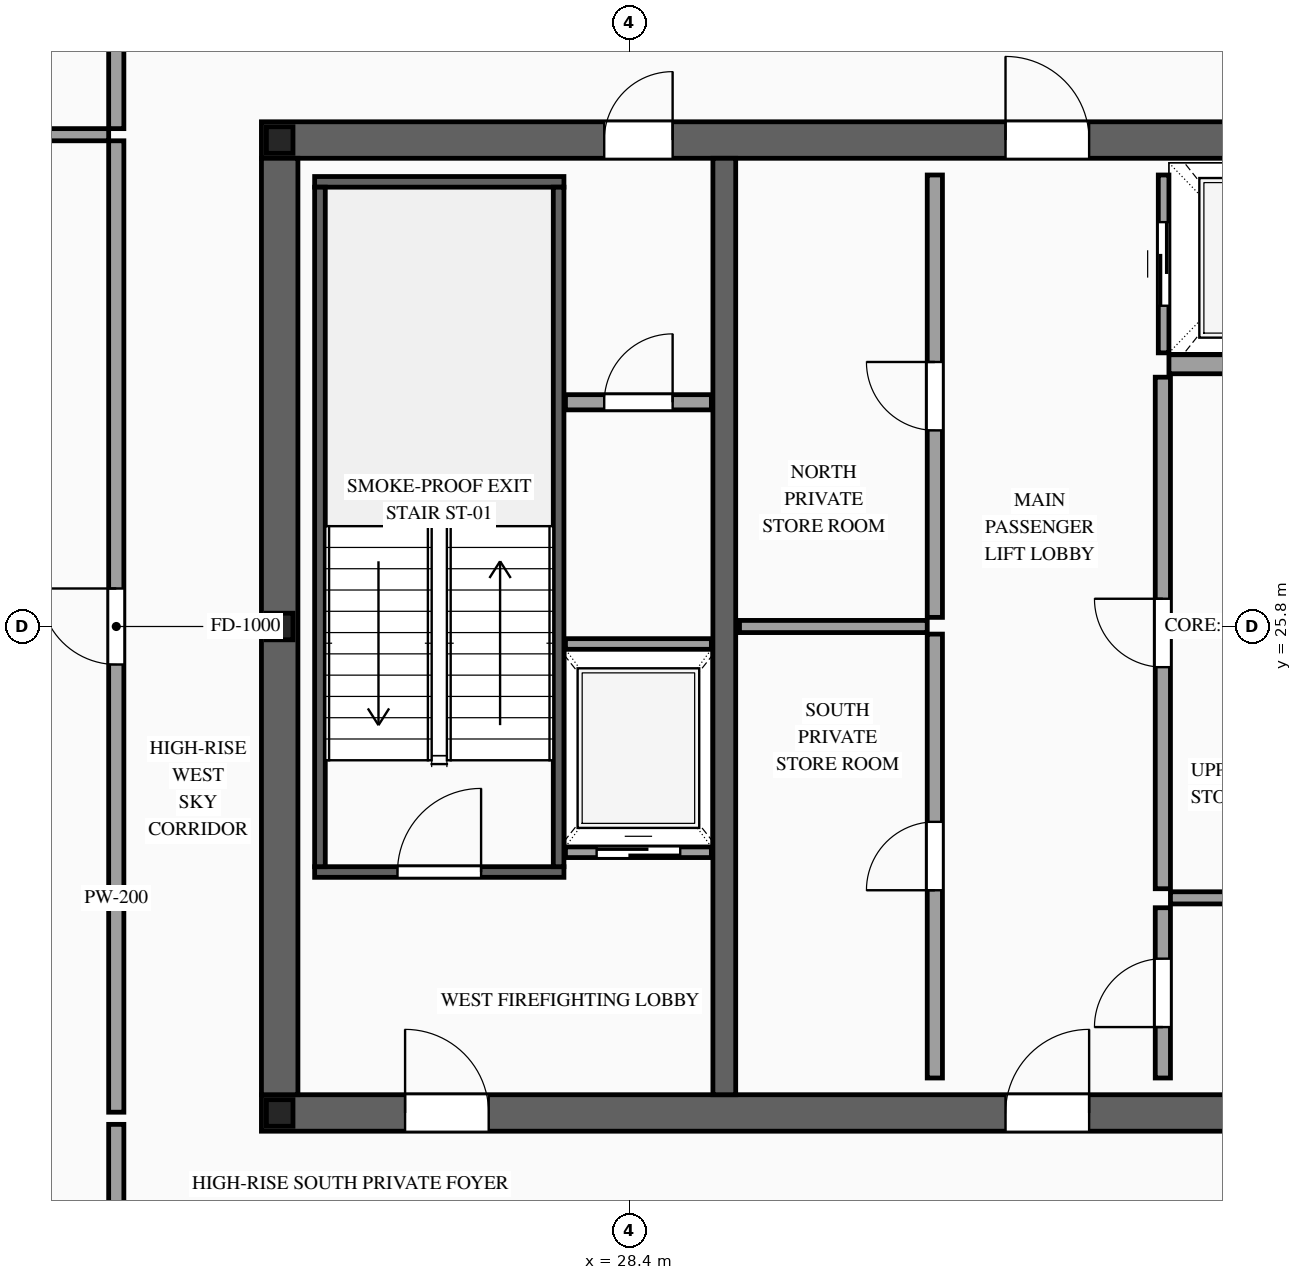
"""IFC4 building model, lengths in metres.
Left out: names, types, materials, properties, quantities, classifications, styles, units other than length and angle.
Written with IfcOpenShell. Run it as: python <this file> out.ifc"""

import sys

from ifc_helpers import new_model, si_unit, direction, frame, frame_2d, origin, origin_2d, place, context, subcontext, project, spatial, rectangle, i_section, extrude, source, transform, mapped, element, fill, save


model = new_model("IFC4")
c1 = context("Model", 3, precision=1e-05, world=origin(), true_north=direction((0.0, 1.0)))
c2 = subcontext(c1, "Body", "Model", "MODEL_VIEW")
j1 = project(units=[si_unit("LENGTHUNIT", "METRE"), si_unit("PLANEANGLEUNIT", "RADIAN")], contexts=[c1])
p1 = place(None, origin())
s1 = spatial("IfcSite", under=j1, at=p1, CompositionType="ELEMENT")
p2 = place(p1, origin())
s2 = spatial("IfcBuilding", under=s1, at=p2, CompositionType="ELEMENT")
p3 = place(p2, frame((0.0, 0.0, 339.2)))
s3 = spatial("IfcBuildingStorey", under=s2, at=p3, CompositionType="ELEMENT", Elevation=339.2)
p4 = place(p3, frame((23.56, 19.4, 0.0), z_axis=(0.0, 0.0, 1.0), x_axis=(1.0, 0.0, 0.0)))
e1 = element("IfcWall", 1, at=p4, inside=s3, PredefinedType="SHEAR", context=c2, shape_type="SweptSolid", body=[
    extrude(rectangle(XDim=26.88, YDim=0.48, at=frame_2d((13.44, 0.0))), origin(), (0.0, 0.0, 1.0), 4.0),
])
p5 = place(p4, frame((1.89, 0.0, 0.0)))
e2 = element("IfcOpeningElement", 2, at=p5, cuts=e1, PredefinedType="OPENING", context=c2, shape_type="SweptSolid", body=[
    extrude(rectangle(XDim=1.1, YDim=2.2, at=frame_2d((0.55, 1.1))), frame((0.0, 0.255, 0.0), z_axis=(0.0, -1.0, 0.0), x_axis=(1.0, 0.0, 0.0)), (0.0, 0.0, 1.0), 0.51),
])
p6 = place(p4, frame((9.79, 0.0, 0.0)))
e3 = element("IfcOpeningElement", 3, at=p6, cuts=e1, PredefinedType="OPENING", context=c2, shape_type="SweptSolid", body=[
    extrude(rectangle(XDim=1.1, YDim=2.2, at=frame_2d((0.55, 1.1))), frame((0.0, 0.255, 0.0), z_axis=(0.0, -1.0, 0.0), x_axis=(1.0, 0.0, 0.0)), (0.0, 0.0, 1.0), 0.51),
])
p7 = place(p4, frame((22.99, 0.0, 0.0)))
e4 = element("IfcOpeningElement", 4, at=p7, cuts=e1, PredefinedType="OPENING", context=c2, shape_type="SweptSolid", body=[
    extrude(rectangle(XDim=1.1, YDim=2.2, at=frame_2d((0.55, 1.1))), frame((0.0, 0.255, 0.0), z_axis=(0.0, -1.0, 0.0), x_axis=(1.0, 0.0, 0.0)), (0.0, 0.0, 1.0), 0.51),
])
p8 = place(p4, frame((19.61, 0.0, 0.0)))
e5 = element("IfcOpeningElement", 5, at=p8, cuts=e1, PredefinedType="OPENING", context=c2, shape_type="SweptSolid", body=[
    extrude(rectangle(XDim=0.9, YDim=2.15, at=frame_2d((0.45, 1.075))), frame((0.0, 0.255, 0.0), z_axis=(0.0, -1.0, 0.0), x_axis=(1.0, 0.0, 0.0)), (0.0, 0.0, 1.0), 0.51),
])
p9 = place(p4, frame((18.17, 0.0, 0.0)))
e6 = element("IfcOpeningElement", 6, at=p9, cuts=e1, PredefinedType="OPENING", context=c2, shape_type="SweptSolid", body=[
    extrude(rectangle(XDim=0.9, YDim=2.15, at=frame_2d((0.45, 1.075))), frame((0.0, 0.255, 0.0), z_axis=(0.0, -1.0, 0.0), x_axis=(1.0, 0.0, 0.0)), (0.0, 0.0, 1.0), 0.51),
])
p10 = place(p3, frame((23.56, 32.2, 0.0), z_axis=(0.0, 0.0, 1.0), x_axis=(1.0, 0.0, 0.0)))
e7 = element("IfcWall", 7, at=p10, inside=s3, PredefinedType="SHEAR", context=c2, shape_type="SweptSolid", body=[
    extrude(rectangle(XDim=26.88, YDim=0.48, at=frame_2d((13.44, 0.0))), origin(), (0.0, 0.0, 1.0), 4.0),
])
p11 = place(p10, frame((4.51, 0.0, 0.0)))
e8 = element("IfcOpeningElement", 8, at=p11, cuts=e7, PredefinedType="OPENING", context=c2, shape_type="SweptSolid", body=[
    extrude(rectangle(XDim=0.9, YDim=2.15, at=frame_2d((0.45, 1.075))), frame((0.0, 0.255, 0.0), z_axis=(0.0, -1.0, 0.0), x_axis=(1.0, 0.0, 0.0)), (0.0, 0.0, 1.0), 0.51),
])
p12 = place(p10, frame((9.79, 0.0, 0.0)))
e9 = element("IfcOpeningElement", 9, at=p12, cuts=e7, PredefinedType="OPENING", context=c2, shape_type="SweptSolid", body=[
    extrude(rectangle(XDim=1.1, YDim=2.2, at=frame_2d((0.55, 1.1))), frame((0.0, 0.255, 0.0), z_axis=(0.0, -1.0, 0.0), x_axis=(1.0, 0.0, 0.0)), (0.0, 0.0, 1.0), 0.51),
])
p13 = place(p10, frame((15.64, 0.0, 0.0)))
e10 = element("IfcOpeningElement", 10, at=p13, cuts=e7, PredefinedType="OPENING", context=c2, shape_type="SweptSolid", body=[
    extrude(rectangle(XDim=1.1, YDim=2.2, at=frame_2d((0.55, 1.1))), frame((0.0, 0.255, 0.0), z_axis=(0.0, -1.0, 0.0), x_axis=(1.0, 0.0, 0.0)), (0.0, 0.0, 1.0), 0.51),
])
p14 = place(p10, frame((18.74, 0.0, 0.0)))
e11 = element("IfcOpeningElement", 11, at=p14, cuts=e7, PredefinedType="OPENING", context=c2, shape_type="SweptSolid", body=[
    extrude(rectangle(XDim=1.1, YDim=2.2, at=frame_2d((0.55, 1.1))), frame((0.0, 0.255, 0.0), z_axis=(0.0, -1.0, 0.0), x_axis=(1.0, 0.0, 0.0)), (0.0, 0.0, 1.0), 0.51),
])
m1 = source(origin(), c2, "Body", "SweptSolid", [
    extrude(rectangle(XDim=12.32, YDim=0.48, at=frame_2d((6.16, 0.0))), origin(), (0.0, 0.0, 1.0), 4.0),
])
p15 = place(p3, frame((23.8, 19.64, 0.0), z_axis=(0.0, 0.0, 1.0), x_axis=(0.0, 1.0, 0.0)))
e12 = element("IfcWall", 12, at=p15, inside=s3, PredefinedType="SHEAR", context=c2, shape_type="MappedRepresentation", body=[
    mapped(m1, transform((0.0, 0.0, 0.0), scale=1.0)),
])
m2 = source(origin(), c2, "Body", "SweptSolid", [
    extrude(rectangle(XDim=12.32, YDim=0.3, at=frame_2d((6.16, 0.0))), origin(), (0.0, 0.0, 1.0), 4.0),
])
p16 = place(p3, frame((29.65, 19.64, 0.0), z_axis=(0.0, 0.0, 1.0), x_axis=(0.0, 1.0, 0.0)))
e13 = element("IfcWall", 13, at=p16, inside=s3, PredefinedType="SOLIDWALL", context=c2, shape_type="MappedRepresentation", body=[
    mapped(m2, transform((0.0, 0.0, 0.0), scale=1.0)),
])
m3 = source(origin(), c2, "Body", "SweptSolid", [
    extrude(i_section(OverallWidth=0.35, OverallDepth=0.35, WebThickness=0.012, FlangeThickness=0.019, at=origin_2d()), origin(), (0.0, 0.0, 1.0), 4.0),
])
for number, where, z_axis, x_axis in (
    (14, (23.8, 19.4, 0.0), (0.0, 0.0, 1.0), (1.0, 0.0, 0.0)),
    (15, (23.8, 25.8, 0.0), (0.0, 0.0, 1.0), (1.0, 0.0, 0.0)),
    (16, (23.8, 32.2, 0.0), (0.0, 0.0, 1.0), (1.0, 0.0, 0.0)),
):
    element("IfcColumn", number, at=place(p3, frame(where, z_axis=z_axis, x_axis=x_axis)), inside=s3, PredefinedType="COLUMN", context=c2, shape_type="MappedRepresentation", body=[
        mapped(m3, transform((0.0, 0.0, 0.0), scale=1.0)),
    ])
p17 = place(p3, frame((27.56, 22.83, 0.0), z_axis=(0.0, 0.0, 1.0), x_axis=(1.0, 0.0, 0.0)))
e17 = element("IfcWall", 17, at=p17, inside=s3, PredefinedType="SOLIDWALL", context=c2, shape_type="SweptSolid", body=[
    extrude(rectangle(XDim=1.92, YDim=0.14, at=frame_2d((0.96, 0.0))), origin(), (0.0, 0.0, 1.0), 3.76),
])
p18 = place(p17, frame((0.41, 0.0, 0.0)))
e18 = element("IfcOpeningElement", 18, at=p18, cuts=e17, PredefinedType="OPENING", context=c2, shape_type="SweptSolid", body=[
    extrude(rectangle(XDim=1.1, YDim=2.2, at=frame_2d((0.55, 1.1))), frame((0.0, 0.085, 0.0), z_axis=(0.0, -1.0, 0.0), x_axis=(1.0, 0.0, 0.0)), (0.0, 0.0, 1.0), 0.17),
])
m4 = source(origin(), c2, "Body", "SweptSolid", [
    extrude(rectangle(XDim=1.92, YDim=0.14, at=frame_2d((0.96, 0.0))), origin(), (0.0, 0.0, 1.0), 3.76),
])
p19 = place(p3, frame((27.56, 25.57, 0.0), z_axis=(0.0, 0.0, 1.0), x_axis=(1.0, 0.0, 0.0)))
e19 = element("IfcWall", 19, at=p19, inside=s3, PredefinedType="SOLIDWALL", context=c2, shape_type="MappedRepresentation", body=[
    mapped(m4, transform((0.0, 0.0, 0.0), scale=1.0)),
])
p20 = place(p3, frame((35.43, 29.4, 0.0), z_axis=(0.0, 0.0, 1.0), x_axis=(0.0, 1.0, 0.0)))
e20 = element("IfcWall", 20, at=p20, inside=s3, PredefinedType="SOLIDWALL", context=c2, shape_type="SweptSolid", body=[
    extrude(rectangle(XDim=2.34, YDim=0.14, at=frame_2d((1.17, 0.0))), origin(), (0.0, 0.0, 1.0), 3.76),
])
p21 = place(p20, frame((0.62, 0.0, 0.0)))
e21 = element("IfcOpeningElement", 21, at=p21, cuts=e20, PredefinedType="OPENING", context=c2, shape_type="SweptSolid", body=[
    extrude(rectangle(XDim=1.1, YDim=2.2, at=frame_2d((0.55, 1.1))), frame((0.0, 0.085, 0.0), z_axis=(0.0, -1.0, 0.0), x_axis=(1.0, 0.0, 0.0)), (0.0, 0.0, 1.0), 0.17),
])
m5 = source(origin(), c2, "Body", "SweptSolid", [
    extrude(rectangle(XDim=2.4, YDim=0.25, at=frame_2d((1.2, 0.0))), origin(), (0.0, 0.0, 1.0), 3.76),
])
p22 = place(p3, frame((35.5, 29.25, 0.0), z_axis=(0.0, 0.0, 1.0), x_axis=(1.0, 0.0, 0.0)))
e22 = element("IfcWall", 22, at=p22, inside=s3, PredefinedType="SOLIDWALL", context=c2, shape_type="MappedRepresentation", body=[
    mapped(m5, transform((0.0, 0.0, 0.0), scale=1.0)),
])
p23 = place(p3, frame((24.26, 22.57, 0.0), z_axis=(0.0, 0.0, 1.0), x_axis=(1.0, 0.0, 0.0)))
e23 = element("IfcWall", 23, at=p23, inside=s3, PredefinedType="SOLIDWALL", context=c2, shape_type="SweptSolid", body=[
    extrude(rectangle(XDim=3.28, YDim=0.14, at=frame_2d((1.64, 0.0))), origin(), (0.0, 0.0, 1.0), 3.76),
])
p24 = place(p23, frame((1.09, 0.0, 0.0)))
e24 = element("IfcOpeningElement", 24, at=p24, cuts=e23, PredefinedType="OPENING", context=c2, shape_type="SweptSolid", body=[
    extrude(rectangle(XDim=1.1, YDim=2.2, at=frame_2d((0.55, 1.1))), frame((0.0, 0.085, 0.0), z_axis=(0.0, -1.0, 0.0), x_axis=(1.0, 0.0, 0.0)), (0.0, 0.0, 1.0), 0.17),
])
m6 = source(origin(), c2, "Body", "SweptSolid", [
    extrude(rectangle(XDim=3.28, YDim=0.14, at=frame_2d((1.64, 0.0))), origin(), (0.0, 0.0, 1.0), 3.76),
])
p25 = place(p3, frame((24.26, 31.65, 0.0), z_axis=(0.0, 0.0, 1.0), x_axis=(1.0, 0.0, 0.0)))
e25 = element("IfcWall", 25, at=p25, inside=s3, PredefinedType="SOLIDWALL", context=c2, shape_type="MappedRepresentation", body=[
    mapped(m6, transform((0.0, 0.0, 0.0), scale=1.0)),
])
m7 = source(origin(), c2, "Body", "SweptSolid", [
    extrude(rectangle(XDim=8.94, YDim=0.14, at=frame_2d((4.47, 0.0))), origin(), (0.0, 0.0, 1.0), 3.76),
])
for number, where, z_axis, x_axis in (
    (26, (24.33, 22.64, 0.0), (0.0, 0.0, 1.0), (0.0, 1.0, 0.0)),
    (27, (27.47, 22.64, 0.0), (0.0, 0.0, 1.0), (0.0, 1.0, 0.0)),
):
    element("IfcWall", number, at=place(p3, frame(where, z_axis=z_axis, x_axis=x_axis)), inside=s3, PredefinedType="SOLIDWALL", context=c2, shape_type="MappedRepresentation", body=[
        mapped(m7, transform((0.0, 0.0, 0.0), scale=1.0)),
    ])
p26 = place(p3, frame((27.56, 28.75, 0.0), z_axis=(0.0, 0.0, 1.0), x_axis=(1.0, 0.0, 0.0)))
e28 = element("IfcWall", 28, at=p26, inside=s3, PredefinedType="PARTITIONING", context=c2, shape_type="SweptSolid", body=[
    extrude(rectangle(XDim=1.92, YDim=0.2, at=frame_2d((0.96, 0.0))), origin(), (0.0, 0.0, 1.0), 3.76),
])
p27 = place(p26, frame((0.51, 0.0, 0.0)))
e29 = element("IfcOpeningElement", 29, at=p27, cuts=e28, PredefinedType="OPENING", context=c2, shape_type="SweptSolid", body=[
    extrude(rectangle(XDim=0.9, YDim=2.15, at=frame_2d((0.45, 1.075))), frame((0.0, 0.115, 0.0), z_axis=(0.0, -1.0, 0.0), x_axis=(1.0, 0.0, 0.0)), (0.0, 0.0, 1.0), 0.23),
])
p28 = place(p3, frame((32.42, 19.86, 0.0), z_axis=(0.0, 0.0, 1.0), x_axis=(0.0, 1.0, 0.0)))
e30 = element("IfcWall", 30, at=p28, inside=s3, PredefinedType="PARTITIONING", context=c2, shape_type="SweptSolid", body=[
    extrude(rectangle(XDim=5.84, YDim=0.2, at=frame_2d((2.92, 0.0))), origin(), (0.0, 0.0, 1.0), 3.76),
])
p29 = place(p28, frame((2.47, 0.0, 0.0)))
e31 = element("IfcOpeningElement", 31, at=p29, cuts=e30, PredefinedType="OPENING", context=c2, shape_type="SweptSolid", body=[
    extrude(rectangle(XDim=0.9, YDim=2.15, at=frame_2d((0.45, 1.075))), frame((0.0, 0.115, 0.0), z_axis=(0.0, -1.0, 0.0), x_axis=(1.0, 0.0, 0.0)), (0.0, 0.0, 1.0), 0.23),
])
p30 = place(p3, frame((32.42, 25.92, 0.0), z_axis=(0.0, 0.0, 1.0), x_axis=(0.0, 1.0, 0.0)))
e32 = element("IfcWall", 32, at=p30, inside=s3, PredefinedType="PARTITIONING", context=c2, shape_type="SweptSolid", body=[
    extrude(rectangle(XDim=5.82, YDim=0.2, at=frame_2d((2.91, 0.0))), origin(), (0.0, 0.0, 1.0), 3.76),
])
p31 = place(p30, frame((2.46, 0.0, 0.0)))
e33 = element("IfcOpeningElement", 33, at=p31, cuts=e32, PredefinedType="OPENING", context=c2, shape_type="SweptSolid", body=[
    extrude(rectangle(XDim=0.9, YDim=2.15, at=frame_2d((0.45, 1.075))), frame((0.0, 0.115, 0.0), z_axis=(0.0, -1.0, 0.0), x_axis=(1.0, 0.0, 0.0)), (0.0, 0.0, 1.0), 0.23),
])
m8 = source(origin(), c2, "Body", "SweptSolid", [
    extrude(rectangle(XDim=2.47, YDim=0.16, at=frame_2d((1.235, 0.0))), origin(), (0.0, 0.0, 1.0), 3.76),
])
p32 = place(p3, frame((29.85, 25.8, 0.0), z_axis=(0.0, 0.0, 1.0), x_axis=(1.0, 0.0, 0.0)))
e34 = element("IfcWall", 34, at=p32, inside=s3, PredefinedType="PARTITIONING", context=c2, shape_type="MappedRepresentation", body=[
    mapped(m8, transform((0.0, 0.0, 0.0), scale=1.0)),
])
p33 = place(p3, frame((35.42, 19.86, 0.0), z_axis=(0.0, 0.0, 1.0), x_axis=(0.0, 1.0, 0.0)))
e35 = element("IfcWall", 35, at=p33, inside=s3, PredefinedType="PARTITIONING", context=c2, shape_type="SweptSolid", body=[
    extrude(rectangle(XDim=2.24, YDim=0.2, at=frame_2d((1.12, 0.0))), origin(), (0.0, 0.0, 1.0), 3.76),
])
p34 = place(p33, frame((0.67, 0.0, 0.0)))
e36 = element("IfcOpeningElement", 36, at=p34, cuts=e35, PredefinedType="OPENING", context=c2, shape_type="SweptSolid", body=[
    extrude(rectangle(XDim=0.9, YDim=2.15, at=frame_2d((0.45, 1.075))), frame((0.0, 0.115, 0.0), z_axis=(0.0, -1.0, 0.0), x_axis=(1.0, 0.0, 0.0)), (0.0, 0.0, 1.0), 0.23),
])
p35 = place(p3, frame((35.42, 22.35, 0.0), z_axis=(0.0, 0.0, 1.0), x_axis=(0.0, 1.0, 0.0)))
e37 = element("IfcWall", 37, at=p35, inside=s3, PredefinedType="PARTITIONING", context=c2, shape_type="SweptSolid", body=[
    extrude(rectangle(XDim=6.73, YDim=0.2, at=frame_2d((3.365, 0.0))), origin(), (0.0, 0.0, 1.0), 3.76),
])
p36 = place(p35, frame((2.915, 0.0, 0.0)))
e38 = element("IfcOpeningElement", 38, at=p36, cuts=e37, PredefinedType="OPENING", context=c2, shape_type="SweptSolid", body=[
    extrude(rectangle(XDim=0.9, YDim=2.15, at=frame_2d((0.45, 1.075))), frame((0.0, 0.115, 0.0), z_axis=(0.0, -1.0, 0.0), x_axis=(1.0, 0.0, 0.0)), (0.0, 0.0, 1.0), 0.23),
])
m9 = source(origin(), c2, "Body", "SweptSolid", [
    extrude(rectangle(XDim=2.36, YDim=0.16, at=frame_2d((1.18, 0.0))), origin(), (0.0, 0.0, 1.0), 3.76),
])
p37 = place(p3, frame((35.52, 22.23, 0.0), z_axis=(0.0, 0.0, 1.0), x_axis=(1.0, 0.0, 0.0)))
e39 = element("IfcWall", 39, at=p37, inside=s3, PredefinedType="PARTITIONING", context=c2, shape_type="MappedRepresentation", body=[
    mapped(m9, transform((0.0, 0.0, 0.0), scale=1.0)),
])
m10 = source(origin(), c2, "Body", "SweptSolid", [
    extrude(rectangle(XDim=1.7, YDim=0.2, at=frame_2d((0.85, 0.0))), origin(), (0.0, 0.0, 1.0), 3.76),
])
for number, where, z_axis, x_axis in (
    (40, (21.65, 32.35, 0.0), (0.0, 0.0, 1.0), (0.0, 1.0, 0.0)),
    (41, (21.65, 17.55, 0.0), (0.0, 0.0, 1.0), (0.0, 1.0, 0.0)),
):
    element("IfcWall", number, at=place(p3, frame(where, z_axis=z_axis, x_axis=x_axis)), inside=s3, PredefinedType="PARTITIONING", context=c2, shape_type="MappedRepresentation", body=[
        mapped(m10, transform((0.0, 0.0, 0.0), scale=1.0)),
    ])
p38 = place(p3, frame((21.65, 19.41, 0.0), z_axis=(0.0, 0.0, 1.0), x_axis=(0.0, 1.0, 0.0)))
e42 = element("IfcWall", 42, at=p38, inside=s3, PredefinedType="PARTITIONING", context=c2, shape_type="SweptSolid", body=[
    extrude(rectangle(XDim=12.78, YDim=0.2, at=frame_2d((6.39, 0.0))), origin(), (0.0, 0.0, 1.0), 3.76),
])
p39 = place(p38, frame((5.89, 0.0, 0.0)))
e43 = element("IfcOpeningElement", 43, at=p39, cuts=e42, PredefinedType="OPENING", context=c2, shape_type="SweptSolid", body=[
    extrude(rectangle(XDim=1.0, YDim=2.2, at=frame_2d((0.5, 1.1))), frame((0.0, 0.115, 0.0), z_axis=(0.0, -1.0, 0.0), x_axis=(1.0, 0.0, 0.0)), (0.0, 0.0, 1.0), 0.23),
])
m11 = source(origin(), c2, "Body", "SweptSolid", [
    extrude(rectangle(XDim=3.5, YDim=0.16, at=frame_2d((1.75, 0.0))), origin(), (0.0, 0.0, 1.0), 3.305),
])
p40 = place(p3, frame((18.05, 32.27, 0.0), z_axis=(0.0, 0.0, 1.0), x_axis=(1.0, 0.0, 0.0)))
e44 = element("IfcWall", 44, at=p40, inside=s3, PredefinedType="PARTITIONING", context=c2, shape_type="MappedRepresentation", body=[
    mapped(m11, transform((0.0, 0.0, 0.0), scale=1.0)),
])
m12 = source(origin(), c2, "Body", "SweptSolid", [
    extrude(rectangle(XDim=1.1, YDim=2.2, at=frame_2d((0.55, 1.1))), frame((0.0, 0.025, 0.0), z_axis=(0.0, -1.0, 0.0), x_axis=(1.0, 0.0, 0.0)), (0.0, 0.0, 1.0), 0.05),
])
p41 = place(p18, origin())
e45 = element("IfcDoor", 45, at=p41, inside=s3, OperationType="SLIDING_TO_LEFT", PredefinedType="DOOR", context=c2, shape_type="MappedRepresentation", body=[
    mapped(m12, transform((0.0, 0.0, 0.0), scale=1.0)),
])
fill(e18, e45)
p42 = place(p21, origin())
e46 = element("IfcDoor", 46, at=p42, inside=s3, OperationType="SLIDING_TO_RIGHT", PredefinedType="DOOR", context=c2, shape_type="MappedRepresentation", body=[
    mapped(m12, transform((0.0, 0.0, 0.0), scale=1.0)),
])
fill(e21, e46)
m13 = source(origin(), c2, "Body", "SweptSolid", [
    extrude(rectangle(XDim=1.1, YDim=2.2, at=frame_2d((0.55, 1.1))), frame((0.0, 0.025, 0.0), z_axis=(0.0, -1.0, 0.0), x_axis=(1.0, 0.0, 0.0)), (0.0, 0.0, 1.0), 0.05),
])
p43 = place(p24, origin())
e47 = element("IfcDoor", 47, at=p43, inside=s3, OperationType="SINGLE_SWING_RIGHT", PredefinedType="DOOR", context=c2, shape_type="MappedRepresentation", body=[
    mapped(m13, transform((0.0, 0.0, 0.0), scale=1.0)),
])
fill(e24, e47)
p44 = place(p5, origin())
e48 = element("IfcDoor", 48, at=p44, inside=s3, OperationType="SINGLE_SWING_LEFT", PredefinedType="DOOR", context=c2, shape_type="MappedRepresentation", body=[
    mapped(m13, transform((0.0, 0.0, 0.0), scale=1.0)),
])
fill(e2, e48)
p45 = place(p6, origin())
e49 = element("IfcDoor", 49, at=p45, inside=s3, OperationType="SINGLE_SWING_RIGHT", PredefinedType="DOOR", context=c2, shape_type="MappedRepresentation", body=[
    mapped(m13, transform((0.0, 0.0, 0.0), scale=1.0)),
])
fill(e3, e49)
m14 = source(origin(), c2, "Body", "SweptSolid", [
    extrude(rectangle(XDim=0.9, YDim=2.15, at=frame_2d((0.45, 1.075))), frame((0.0, 0.025, 0.0), z_axis=(0.0, -1.0, 0.0), x_axis=(1.0, 0.0, 0.0)), (0.0, 0.0, 1.0), 0.05),
])
p46 = place(p11, origin())
e50 = element("IfcDoor", 50, at=p46, inside=s3, OperationType="SINGLE_SWING_RIGHT", PredefinedType="DOOR", context=c2, shape_type="MappedRepresentation", body=[
    mapped(m14, transform((0.0, 0.0, 0.0), scale=1.0)),
])
fill(e8, e50)
p47 = place(p12, origin())
e51 = element("IfcDoor", 51, at=p47, inside=s3, OperationType="SINGLE_SWING_LEFT", PredefinedType="DOOR", context=c2, shape_type="MappedRepresentation", body=[
    mapped(m13, transform((0.0, 0.0, 0.0), scale=1.0)),
])
fill(e9, e51)
p48 = place(p27, origin())
e52 = element("IfcDoor", 52, at=p48, inside=s3, OperationType="SINGLE_SWING_RIGHT", PredefinedType="DOOR", context=c2, shape_type="MappedRepresentation", body=[
    mapped(m14, transform((0.0, 0.0, 0.0), scale=1.0)),
])
fill(e29, e52)
p49 = place(p29, origin())
e53 = element("IfcDoor", 53, at=p49, inside=s3, OperationType="SINGLE_SWING_LEFT", PredefinedType="DOOR", context=c2, shape_type="MappedRepresentation", body=[
    mapped(m14, transform((0.0, 0.0, 0.0), scale=1.0)),
])
fill(e31, e53)
p50 = place(p31, origin())
e54 = element("IfcDoor", 54, at=p50, inside=s3, OperationType="SINGLE_SWING_RIGHT", PredefinedType="DOOR", context=c2, shape_type="MappedRepresentation", body=[
    mapped(m14, transform((0.0, 0.0, 0.0), scale=1.0)),
])
fill(e33, e54)
p51 = place(p34, origin())
e55 = element("IfcDoor", 55, at=p51, inside=s3, OperationType="SINGLE_SWING_LEFT", PredefinedType="DOOR", context=c2, shape_type="MappedRepresentation", body=[
    mapped(m14, transform((0.0, 0.0, 0.0), scale=1.0)),
])
fill(e36, e55)
p52 = place(p36, origin())
e56 = element("IfcDoor", 56, at=p52, inside=s3, OperationType="SINGLE_SWING_RIGHT", PredefinedType="DOOR", context=c2, shape_type="MappedRepresentation", body=[
    mapped(m14, transform((0.0, 0.0, 0.0), scale=1.0)),
])
fill(e38, e56)
m15 = source(origin(), c2, "Body", "SweptSolid", [
    extrude(rectangle(XDim=1.0, YDim=2.2, at=frame_2d((0.5, 1.1))), frame((0.0, 0.025, 0.0), z_axis=(0.0, -1.0, 0.0), x_axis=(1.0, 0.0, 0.0)), (0.0, 0.0, 1.0), 0.05),
])
p53 = place(p39, origin())
e57 = element("IfcDoor", 57, at=p53, inside=s3, OperationType="SINGLE_SWING_RIGHT", PredefinedType="DOOR", context=c2, shape_type="MappedRepresentation", body=[
    mapped(m15, transform((0.0, 0.0, 0.0), scale=1.0)),
])
fill(e43, e57)
save(model, sys.argv[1])
